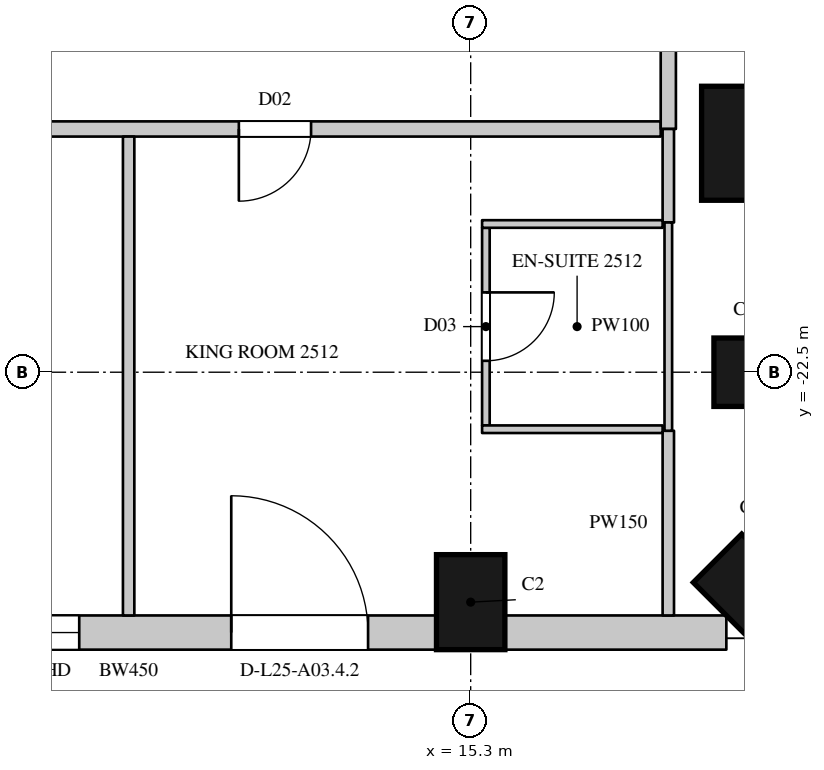
"""IFC4 building model, lengths in metres.
Left out: names, types, materials, properties, quantities, classifications, styles, units other than length and angle.
Written with IfcOpenShell. Run it as: python <this file> out.ifc"""

import sys

from ifc_helpers import new_model, si_unit, direction, frame, frame_2d, origin, origin_2d, place, context, subcontext, project, spatial, rectangle, circle, extrude, element, fill, save


model = new_model("IFC4")
c1 = context("Model", 3, precision=1e-05, world=origin(), true_north=direction((0.0, 1.0)))
c2 = subcontext(c1, "Body", "Model", "MODEL_VIEW")
j1 = project(units=[si_unit("LENGTHUNIT", "METRE"), si_unit("PLANEANGLEUNIT", "RADIAN")], contexts=[c1])
p1 = place(None, origin())
s1 = spatial("IfcSite", under=j1, at=p1, CompositionType="ELEMENT")
p2 = place(p1, origin())
s2 = spatial("IfcBuilding", under=s1, at=p2, CompositionType="ELEMENT")
p3 = place(p2, frame((0.0, 0.0, 120.3)))
s3 = spatial("IfcBuildingStorey", under=s2, at=p3, CompositionType="ELEMENT", Elevation=120.3)
for number, where, z_axis, x_axis in (
    (1, (15.3, -25.525, 0.0), (0.0, 0.0, 1.0), (1.0, 0.0, 0.0)),
    (2, (18.99, -25.39, 0.0), (0.0, 0.0, 1.0), (0.707, 0.707, 0.0)),
    (3, (19.125, -22.5, 0.0), (0.0, 0.0, 1.0), (0.0, 1.0, 0.0)),
):
    element("IfcColumn", number, at=place(p3, frame(where, z_axis=z_axis, x_axis=x_axis)), inside=s3, PredefinedType="COLUMN", context=c2, shape_type="SweptSolid", body=[
        extrude(rectangle(XDim=0.9, YDim=1.25, at=origin_2d()), origin(), (0.0, 0.0, 1.0), 3.6),
    ])
p4 = place(p3, frame((19.088, -19.488, 0.0), z_axis=(0.0, 0.0, 1.0), x_axis=(1.0, 0.0, 0.0)))
e4 = element("IfcColumn", 4, at=p4, inside=s3, PredefinedType="COLUMN", context=c2, shape_type="SweptSolid", body=[
    extrude(circle(Radius=0.75, at=origin_2d()), origin(), (0.0, 0.0, 1.0), 3.6),
])
p5 = place(p3, frame((6.75, -25.925, 0.0), z_axis=(0.0, 0.0, 1.0), x_axis=(1.0, 0.0, 0.0)))
e5 = element("IfcWall", 5, at=p5, inside=s3, PredefinedType="SOLIDWALL", context=c2, shape_type="SweptSolid", body=[
    extrude(rectangle(XDim=8.1, YDim=0.45, at=frame_2d((4.05, 0.0))), origin(), (0.0, 0.0, 1.0), 3.3),
])
p6 = place(p5, frame((0.2, 0.0, 0.0)))
e6 = element("IfcOpeningElement", 6, at=p6, cuts=e5, PredefinedType="OPENING", context=c2, shape_type="SweptSolid", body=[
    extrude(rectangle(XDim=1.8, YDim=2.4, at=frame_2d((0.9, 1.2))), frame((0.0, 0.235, 0.0), z_axis=(0.0, -1.0, 0.0), x_axis=(1.0, 0.0, 0.0)), (0.0, 0.0, 1.0), 0.47),
])
p7 = place(p5, frame((2.2, 0.0, 1.05)))
e7 = element("IfcOpeningElement", 7, at=p7, cuts=e5, PredefinedType="OPENING", context=c2, shape_type="SweptSolid", body=[
    extrude(rectangle(XDim=1.2, YDim=2.0, at=frame_2d((0.6, 1.0))), frame((0.0, 0.235, 0.0), z_axis=(0.0, -1.0, 0.0), x_axis=(1.0, 0.0, 0.0)), (0.0, 0.0, 1.0), 0.47),
])
p8 = place(p5, frame((5.4, 0.0, 0.0)))
e8 = element("IfcOpeningElement", 8, at=p8, cuts=e5, PredefinedType="OPENING", context=c2, shape_type="SweptSolid", body=[
    extrude(rectangle(XDim=1.8, YDim=2.4, at=frame_2d((0.9, 1.2))), frame((0.0, 0.235, 0.0), z_axis=(0.0, -1.0, 0.0), x_axis=(1.0, 0.0, 0.0)), (0.0, 0.0, 1.0), 0.47),
])
p9 = place(p3, frame((15.75, -25.925, 0.0), z_axis=(0.0, 0.0, 1.0), x_axis=(1.0, 0.0, 0.0)))
e9 = element("IfcWall", 9, at=p9, inside=s3, PredefinedType="SOLIDWALL", context=c2, shape_type="SweptSolid", body=[
    extrude(rectangle(XDim=2.914, YDim=0.45, at=frame_2d((1.457, 0.0))), origin(), (0.0, 0.0, 1.0), 3.3),
])
p10 = place(p3, frame((-20.8, -19.3, 0.0), z_axis=(0.0, 0.0, 1.0), x_axis=(1.0, 0.0, 0.0)))
e10 = element("IfcWall", 10, at=p10, inside=s3, PredefinedType="PARTITIONING", context=c2, shape_type="SweptSolid", body=[
    extrude(rectangle(XDim=38.6, YDim=0.2, at=frame_2d((19.3, 0.0))), origin(), (0.0, 0.0, 1.0), 3.3),
])
p11 = place(p10, frame((11.2, 0.0, 0.0)))
e11 = element("IfcOpeningElement", 11, at=p11, cuts=e10, PredefinedType="OPENING", context=c2, shape_type="SweptSolid", body=[
    extrude(rectangle(XDim=0.95, YDim=2.2, at=frame_2d((0.475, 1.1))), frame((0.0, 0.11, 0.0), z_axis=(0.0, -1.0, 0.0), x_axis=(1.0, 0.0, 0.0)), (0.0, 0.0, 1.0), 0.22),
])
p12 = place(p10, frame((15.05, 0.0, 0.0)))
e12 = element("IfcOpeningElement", 12, at=p12, cuts=e10, PredefinedType="OPENING", context=c2, shape_type="SweptSolid", body=[
    extrude(rectangle(XDim=0.95, YDim=2.2, at=frame_2d((0.475, 1.1))), frame((0.0, 0.11, 0.0), z_axis=(0.0, -1.0, 0.0), x_axis=(1.0, 0.0, 0.0)), (0.0, 0.0, 1.0), 0.22),
])
p13 = place(p10, frame((29.2, 0.0, 0.0)))
e13 = element("IfcOpeningElement", 13, at=p13, cuts=e10, PredefinedType="OPENING", context=c2, shape_type="SweptSolid", body=[
    extrude(rectangle(XDim=0.95, YDim=2.2, at=frame_2d((0.475, 1.1))), frame((0.0, 0.11, 0.0), z_axis=(0.0, -1.0, 0.0), x_axis=(1.0, 0.0, 0.0)), (0.0, 0.0, 1.0), 0.22),
])
p14 = place(p10, frame((33.05, 0.0, 0.0)))
e14 = element("IfcOpeningElement", 14, at=p14, cuts=e10, PredefinedType="OPENING", context=c2, shape_type="SweptSolid", body=[
    extrude(rectangle(XDim=0.95, YDim=2.2, at=frame_2d((0.475, 1.1))), frame((0.0, 0.11, 0.0), z_axis=(0.0, -1.0, 0.0), x_axis=(1.0, 0.0, 0.0)), (0.0, 0.0, 1.0), 0.22),
])
p15 = place(p3, frame((17.9, -19.3, 0.0), z_axis=(0.0, 0.0, 1.0), x_axis=(0.0, 1.0, 0.0)))
e15 = element("IfcWall", 15, at=p15, inside=s3, PredefinedType="PARTITIONING", context=c2, shape_type="SweptSolid", body=[
    extrude(rectangle(XDim=14.55, YDim=0.2, at=frame_2d((7.275, 0.0))), origin(), (0.0, 0.0, 1.0), 3.3),
])
p16 = place(p15, frame((3.7, 0.0, 0.0)))
e16 = element("IfcOpeningElement", 16, at=p16, cuts=e15, PredefinedType="OPENING", context=c2, shape_type="SweptSolid", body=[
    extrude(rectangle(XDim=0.95, YDim=2.2, at=frame_2d((0.475, 1.1))), frame((0.0, 0.11, 0.0), z_axis=(0.0, -1.0, 0.0), x_axis=(1.0, 0.0, 0.0)), (0.0, 0.0, 1.0), 0.22),
])
p17 = place(p15, frame((13.2, 0.0, 0.0)))
e17 = element("IfcOpeningElement", 17, at=p17, cuts=e15, PredefinedType="OPENING", context=c2, shape_type="SweptSolid", body=[
    extrude(rectangle(XDim=0.95, YDim=2.2, at=frame_2d((0.475, 1.1))), frame((0.0, 0.11, 0.0), z_axis=(0.0, -1.0, 0.0), x_axis=(1.0, 0.0, 0.0)), (0.0, 0.0, 1.0), 0.22),
])
p18 = place(p3, frame((10.8, -25.7, 0.0), z_axis=(0.0, 0.0, 1.0), x_axis=(0.0, 1.0, 0.0)))
e18 = element("IfcWall", 18, at=p18, inside=s3, PredefinedType="PARTITIONING", context=c2, shape_type="SweptSolid", body=[
    extrude(rectangle(XDim=6.3, YDim=0.15, at=frame_2d((3.15, 0.0))), origin(), (0.0, 0.0, 1.0), 2.65),
])
p19 = place(p3, frame((17.9, -25.7, 0.0), z_axis=(0.0, 0.0, 1.0), x_axis=(0.0, 1.0, 0.0)))
e19 = element("IfcWall", 19, at=p19, inside=s3, PredefinedType="PARTITIONING", context=c2, shape_type="SweptSolid", body=[
    extrude(rectangle(XDim=2.43, YDim=0.15, at=frame_2d((1.215, 0.0))), origin(), (0.0, 0.0, 1.0), 3.3),
])
p20 = place(p3, frame((17.9, -20.53, 0.0), z_axis=(0.0, 0.0, 1.0), x_axis=(0.0, 1.0, 0.0)))
e20 = element("IfcWall", 20, at=p20, inside=s3, PredefinedType="PARTITIONING", context=c2, shape_type="SweptSolid", body=[
    extrude(rectangle(XDim=1.23, YDim=0.15, at=frame_2d((0.615, 0.0))), origin(), (0.0, 0.0, 1.0), 3.3),
])
p21 = place(p3, frame((15.5, -23.2, 0.0), z_axis=(0.0, 0.0, 1.0), x_axis=(0.0, 1.0, 0.0)))
e21 = element("IfcWall", 21, at=p21, inside=s3, PredefinedType="PARTITIONING", context=c2, shape_type="SweptSolid", body=[
    extrude(rectangle(XDim=2.6, YDim=0.1, at=frame_2d((1.3, 0.0))), origin(), (0.0, 0.0, 1.0), 2.75),
])
p22 = place(p21, frame((0.85, 0.0, 0.0)))
e22 = element("IfcOpeningElement", 22, at=p22, cuts=e21, PredefinedType="OPENING", context=c2, shape_type="SweptSolid", body=[
    extrude(rectangle(XDim=0.9, YDim=2.2, at=frame_2d((0.45, 1.1))), frame((0.0, 0.06, 0.0), z_axis=(0.0, -1.0, 0.0), x_axis=(1.0, 0.0, 0.0)), (0.0, 0.0, 1.0), 0.12),
])
for number, where, z_axis, x_axis in (
    (23, (15.45, -23.25, 0.0), (0.0, 0.0, 1.0), (1.0, 0.0, 0.0)),
    (24, (15.45, -20.55, 0.0), (0.0, 0.0, 1.0), (1.0, 0.0, 0.0)),
):
    element("IfcWall", number, at=place(p3, frame(where, z_axis=z_axis, x_axis=x_axis)), inside=s3, PredefinedType="PARTITIONING", context=c2, shape_type="SweptSolid", body=[
        extrude(rectangle(XDim=2.375, YDim=0.1, at=frame_2d((1.188, 0.0))), origin(), (0.0, 0.0, 1.0), 3.3),
    ])
p23 = place(p3, frame((17.9, -23.27, 0.0), z_axis=(0.0, 0.0, 1.0), x_axis=(0.0, 1.0, 0.0)))
e25 = element("IfcWall", 25, at=p23, inside=s3, PredefinedType="PARTITIONING", context=c2, shape_type="SweptSolid", body=[
    extrude(rectangle(XDim=2.74, YDim=0.1, at=frame_2d((1.37, 0.0))), origin(), (0.0, 0.0, 1.0), 3.3),
])
p24 = place(p7, origin())
e26 = element("IfcWindow", 26, at=p24, inside=s3, PartitioningType="SINGLE_PANEL", PredefinedType="WINDOW", context=c2, shape_type="SweptSolid", body=[
    extrude(rectangle(XDim=1.2, YDim=2.0, at=frame_2d((0.6, 1.0))), frame((0.0, 0.135, 0.0), z_axis=(0.0, -1.0, 0.0), x_axis=(1.0, 0.0, 0.0)), (0.0, 0.0, 1.0), 0.06),
])
fill(e7, e26)
p25 = place(p8, origin())
e27 = element("IfcDoor", 27, at=p25, inside=s3, OperationType="SLIDING_TO_LEFT", PredefinedType="DOOR", context=c2, shape_type="SweptSolid", body=[
    extrude(rectangle(XDim=1.8, YDim=2.4, at=frame_2d((0.9, 1.2))), frame((0.0, 0.13, 0.0), z_axis=(0.0, -1.0, 0.0), x_axis=(1.0, 0.0, 0.0)), (0.0, 0.0, 1.0), 0.05),
])
fill(e8, e27)
p26 = place(p14, origin())
e28 = element("IfcDoor", 28, at=p26, inside=s3, OperationType="SINGLE_SWING_RIGHT", PredefinedType="DOOR", context=c2, shape_type="SweptSolid", body=[
    extrude(rectangle(XDim=0.95, YDim=2.2, at=frame_2d((0.475, 1.1))), frame((0.0, 0.025, 0.0), z_axis=(0.0, -1.0, 0.0), x_axis=(1.0, 0.0, 0.0)), (0.0, 0.0, 1.0), 0.05),
])
fill(e14, e28)
p27 = place(p22, origin())
e29 = element("IfcDoor", 29, at=p27, inside=s3, OperationType="SINGLE_SWING_LEFT", PredefinedType="DOOR", context=c2, shape_type="SweptSolid", body=[
    extrude(rectangle(XDim=0.9, YDim=2.2, at=frame_2d((0.45, 1.1))), frame((0.0, 0.025, 0.0), z_axis=(0.0, -1.0, 0.0), x_axis=(1.0, 0.0, 0.0)), (0.0, 0.0, 1.0), 0.05),
])
fill(e22, e29)
save(model, sys.argv[1])
